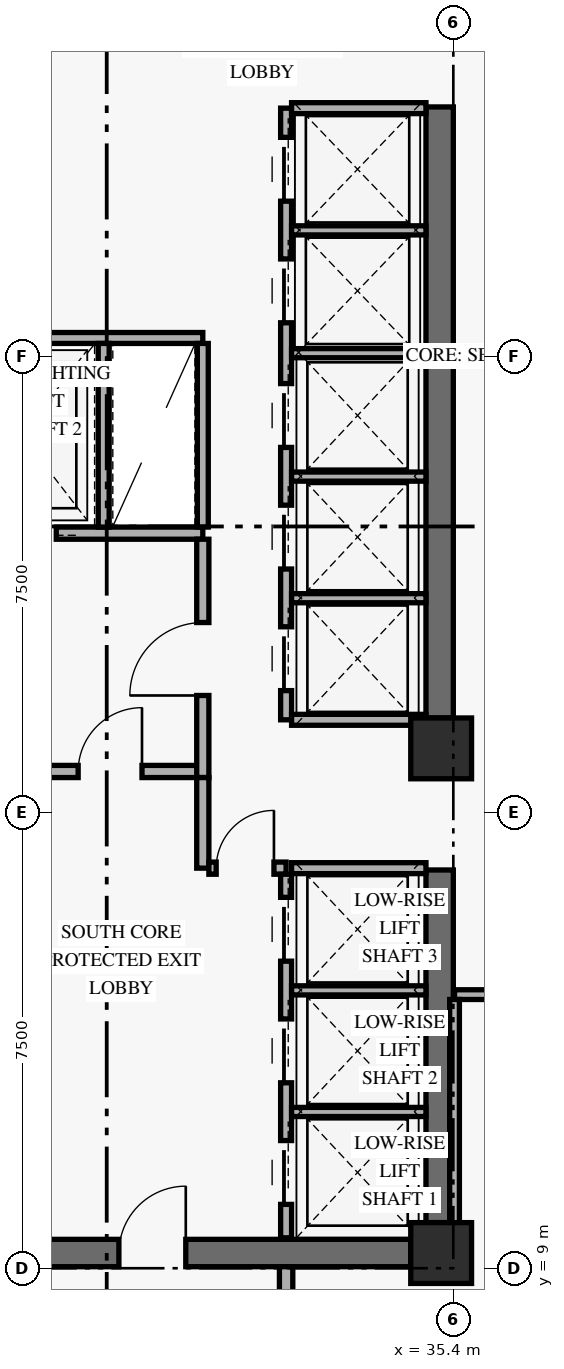
"""IFC4 building model, lengths in metres.
Left out: names, types, materials, properties, quantities, classifications, styles, units other than length and angle.
Written with IfcOpenShell. Run it as: python <this file> out.ifc"""

import sys

from ifc_helpers import new_model, si_unit, direction, frame, frame_2d, origin, origin_2d, place, context, subcontext, project, spatial, rectangle, extrude, element, fill, save


model = new_model("IFC4")
c1 = context("Model", 3, precision=1e-05, world=origin(), true_north=direction((0.0, 1.0)))
c2 = subcontext(c1, "Body", "Model", "MODEL_VIEW")
j1 = project(units=[si_unit("LENGTHUNIT", "METRE"), si_unit("PLANEANGLEUNIT", "RADIAN")], contexts=[c1])
p1 = place(None, origin())
s1 = spatial("IfcSite", under=j1, at=p1, CompositionType="ELEMENT")
p2 = place(p1, origin())
s2 = spatial("IfcBuilding", under=s1, at=p2, CompositionType="ELEMENT")
p3 = place(p2, origin())
s3 = spatial("IfcBuildingStorey", under=s2, at=p3, CompositionType="ELEMENT", Elevation=0.0)
p4 = place(p3, frame((35.175, 9.75, 0.0), z_axis=(0.0, 0.0, 1.0), x_axis=(0.0, 1.0, 0.0)))
e1 = element("IfcWall", 1, at=p4, inside=s3, PredefinedType="SHEAR", context=c2, shape_type="SweptSolid", body=[
    extrude(rectangle(XDim=5.8, YDim=0.45, at=frame_2d((2.9, 0.0))), origin(), (0.0, 0.0, 1.0), 3.539),
])
p5 = place(p3, frame((35.175, 18.05, 0.0), z_axis=(0.0, 0.0, 1.0), x_axis=(0.0, 1.0, 0.0)))
e2 = element("IfcWall", 2, at=p5, inside=s3, PredefinedType="SHEAR", context=c2, shape_type="SweptSolid", body=[
    extrude(rectangle(XDim=10.05, YDim=0.45, at=frame_2d((5.025, 0.0))), origin(), (0.0, 0.0, 1.0), 3.539),
])
p6 = place(p3, frame((24.7, 9.25, 0.0), z_axis=(0.0, 0.0, 1.0), x_axis=(1.0, 0.0, 0.0)))
e3 = element("IfcWall", 3, at=p6, inside=s3, PredefinedType="SHEAR", context=c2, shape_type="SweptSolid", body=[
    extrude(rectangle(XDim=10.0, YDim=0.45, at=frame_2d((5.0, 0.0))), origin(), (0.0, 0.0, 1.0), 4.39),
])
p7 = place(p6, frame((5.2, 0.0, 0.0)))
e4 = element("IfcOpeningElement", 4, at=p7, cuts=e3, PredefinedType="OPENING", context=c2, shape_type="SweptSolid", body=[
    extrude(rectangle(XDim=1.1, YDim=2.15, at=frame_2d((0.55, 1.075))), frame((0.0, 0.235, 0.0), z_axis=(0.0, -1.0, 0.0), x_axis=(1.0, 0.0, 0.0)), (0.0, 0.0, 1.0), 0.47),
])
for number, where, z_axis, x_axis in (
    (5, (35.2, 9.25, 0.0), (0.0, 0.0, 1.0), (1.0, 0.0, 0.0)),
    (6, (35.2, 17.55, 0.0), (0.0, 0.0, 1.0), (1.0, 0.0, 0.0)),
):
    element("IfcColumn", number, at=place(p3, frame(where, z_axis=z_axis, x_axis=x_axis)), inside=s3, PredefinedType="COLUMN", context=c2, shape_type="SweptSolid", body=[
        extrude(rectangle(XDim=1.0, YDim=1.0, at=origin_2d()), origin(), (0.0, 0.0, 1.0), 4.8),
    ])
p8 = place(p3, frame((24.45, 21.09, 0.0), z_axis=(0.0, 0.0, 1.0), x_axis=(1.0, 0.0, 0.0)))
e7 = element("IfcWall", 7, at=p8, inside=s3, PredefinedType="STANDARD", context=c2, shape_type="SweptSolid", body=[
    extrude(rectangle(XDim=6.83, YDim=0.2, at=frame_2d((3.415, 0.0))), origin(), (0.0, 0.0, 1.0), 4.39),
])
p9 = place(p8, frame((0.72, 0.0, 0.0)))
e8 = element("IfcOpeningElement", 8, at=p9, cuts=e7, PredefinedType="OPENING", context=c2, shape_type="SweptSolid", body=[
    extrude(rectangle(XDim=1.1, YDim=2.2, at=frame_2d((0.55, 1.1))), frame((0.0, 0.11, 0.0), z_axis=(0.0, -1.0, 0.0), x_axis=(1.0, 0.0, 0.0)), (0.0, 0.0, 1.0), 0.22),
])
p10 = place(p8, frame((3.32, 0.0, 0.0)))
e9 = element("IfcOpeningElement", 9, at=p10, cuts=e7, PredefinedType="OPENING", context=c2, shape_type="SweptSolid", body=[
    extrude(rectangle(XDim=1.1, YDim=2.2, at=frame_2d((0.55, 1.1))), frame((0.0, 0.11, 0.0), z_axis=(0.0, -1.0, 0.0), x_axis=(1.0, 0.0, 0.0)), (0.0, 0.0, 1.0), 0.22),
])
p11 = place(p3, frame((28.38, 17.17, 0.0), z_axis=(0.0, 0.0, 1.0), x_axis=(1.0, 0.0, 0.0)))
e10 = element("IfcWall", 10, at=p11, inside=s3, PredefinedType="STANDARD", context=c2, shape_type="SweptSolid", body=[
    extrude(rectangle(XDim=2.9, YDim=0.2, at=frame_2d((1.45, 0.0))), origin(), (0.0, 0.0, 1.0), 4.39),
])
p12 = place(p11, frame((0.85, 0.0, 0.0)))
e11 = element("IfcOpeningElement", 11, at=p12, cuts=e10, PredefinedType="OPENING", context=c2, shape_type="SweptSolid", body=[
    extrude(rectangle(XDim=1.05, YDim=2.15, at=frame_2d((0.525, 1.075))), frame((0.0, 0.11, 0.0), z_axis=(0.0, -1.0, 0.0), x_axis=(1.0, 0.0, 0.0)), (0.0, 0.0, 1.0), 0.22),
])
p13 = place(p3, frame((31.28, 17.07, 0.0), z_axis=(0.0, 0.0, 1.0), x_axis=(0.0, 1.0, 0.0)))
e12 = element("IfcWall", 12, at=p13, inside=s3, PredefinedType="STANDARD", context=c2, shape_type="SweptSolid", body=[
    extrude(rectangle(XDim=3.92, YDim=0.2, at=frame_2d((1.96, 0.0))), origin(), (0.0, 0.0, 1.0), 3.272),
])
p14 = place(p13, frame((1.35, 0.0, 0.0)))
e13 = element("IfcOpeningElement", 13, at=p14, cuts=e12, PredefinedType="OPENING", context=c2, shape_type="SweptSolid", body=[
    extrude(rectangle(XDim=1.2, YDim=2.15, at=frame_2d((0.6, 1.075))), frame((0.0, 0.11, 0.0), z_axis=(0.0, -1.0, 0.0), x_axis=(1.0, 0.0, 0.0)), (0.0, 0.0, 1.0), 0.22),
])
p15 = place(p3, frame((24.45, 24.3, 0.0), z_axis=(0.0, 0.0, 1.0), x_axis=(1.0, 0.0, 0.0)))
e14 = element("IfcWall", 14, at=p15, inside=s3, PredefinedType="STANDARD", context=c2, shape_type="SweptSolid", body=[
    extrude(rectangle(XDim=6.83, YDim=0.18, at=frame_2d((3.415, 0.0))), origin(), (0.0, 0.0, 1.0), 4.39),
])
for number, where, z_axis, x_axis in (
    (15, (29.65, 21.19, 0.0), (0.0, 0.0, 1.0), (0.0, 1.0, 0.0)),
    (16, (31.28, 21.19, 0.0), (0.0, 0.0, 1.0), (0.0, 1.0, 0.0)),
):
    element("IfcWall", number, at=place(p3, frame(where, z_axis=z_axis, x_axis=x_axis)), inside=s3, PredefinedType="STANDARD", context=c2, shape_type="SweptSolid", body=[
        extrude(rectangle(XDim=3.02, YDim=0.18, at=frame_2d((1.51, 0.0))), origin(), (0.0, 0.0, 1.0), 4.39),
    ])
p16 = place(p3, frame((31.28, 15.58, 0.0), z_axis=(0.0, 0.0, 1.0), x_axis=(0.0, 1.0, 0.0)))
e17 = element("IfcWall", 17, at=p16, inside=s3, PredefinedType="STANDARD", context=c2, shape_type="SweptSolid", body=[
    extrude(rectangle(XDim=1.49, YDim=0.2, at=frame_2d((0.745, 0.0))), origin(), (0.0, 0.0, 1.0), 4.39),
])
p17 = place(p3, frame((31.38, 15.58, 0.0), z_axis=(0.0, 0.0, 1.0), x_axis=(1.0, 0.0, 0.0)))
e18 = element("IfcWall", 18, at=p17, inside=s3, PredefinedType="STANDARD", context=c2, shape_type="SweptSolid", body=[
    extrude(rectangle(XDim=1.27, YDim=0.2, at=frame_2d((0.635, 0.0))), origin(), (0.0, 0.0, 1.0), 4.39),
])
p18 = place(p17, frame((0.12, 0.0, 0.0)))
e19 = element("IfcOpeningElement", 19, at=p18, cuts=e18, PredefinedType="OPENING", context=c2, shape_type="SweptSolid", body=[
    extrude(rectangle(XDim=0.95, YDim=2.15, at=frame_2d((0.475, 1.075))), frame((0.0, 0.11, 0.0), z_axis=(0.0, -1.0, 0.0), x_axis=(1.0, 0.0, 0.0)), (0.0, 0.0, 1.0), 0.22),
])
p19 = place(p3, frame((32.65, 9.5, 0.0), z_axis=(0.0, 0.0, 1.0), x_axis=(0.0, 1.0, 0.0)))
e20 = element("IfcWall", 20, at=p19, inside=s3, PredefinedType="STANDARD", context=c2, shape_type="SweptSolid", body=[
    extrude(rectangle(XDim=5.98, YDim=0.18, at=frame_2d((2.99, 0.0))), origin(), (0.0, 0.0, 1.0), 4.39),
])
p20 = place(p19, frame((0.55, 0.0, 0.0)))
e21 = element("IfcOpeningElement", 21, at=p20, cuts=e20, PredefinedType="OPENING", context=c2, shape_type="SweptSolid", body=[
    extrude(rectangle(XDim=1.05, YDim=2.2, at=frame_2d((0.525, 1.1))), frame((0.0, 0.1, 0.0), z_axis=(0.0, -1.0, 0.0), x_axis=(1.0, 0.0, 0.0)), (0.0, 0.0, 1.0), 0.2),
])
p21 = place(p19, frame((2.55, 0.0, 0.0)))
e22 = element("IfcOpeningElement", 22, at=p21, cuts=e20, PredefinedType="OPENING", context=c2, shape_type="SweptSolid", body=[
    extrude(rectangle(XDim=1.05, YDim=2.2, at=frame_2d((0.525, 1.1))), frame((0.0, 0.1, 0.0), z_axis=(0.0, -1.0, 0.0), x_axis=(1.0, 0.0, 0.0)), (0.0, 0.0, 1.0), 0.2),
])
p22 = place(p19, frame((4.55, 0.0, 0.0)))
e23 = element("IfcOpeningElement", 23, at=p22, cuts=e20, PredefinedType="OPENING", context=c2, shape_type="SweptSolid", body=[
    extrude(rectangle(XDim=1.05, YDim=2.2, at=frame_2d((0.525, 1.1))), frame((0.0, 0.1, 0.0), z_axis=(0.0, -1.0, 0.0), x_axis=(1.0, 0.0, 0.0)), (0.0, 0.0, 1.0), 0.2),
])
p23 = place(p3, frame((32.74, 15.58, 0.0), z_axis=(0.0, 0.0, 1.0), x_axis=(1.0, 0.0, 0.0)))
e24 = element("IfcWall", 24, at=p23, inside=s3, PredefinedType="STANDARD", context=c2, shape_type="SweptSolid", body=[
    extrude(rectangle(XDim=2.21, YDim=0.18, at=frame_2d((1.105, 0.0))), origin(), (0.0, 0.0, 1.0), 4.39),
])
for number, where, z_axis, x_axis in (
    (25, (32.74, 11.57, 0.0), (0.0, 0.0, 1.0), (1.0, 0.0, 0.0)),
    (26, (32.74, 13.57, 0.0), (0.0, 0.0, 1.0), (1.0, 0.0, 0.0)),
):
    element("IfcWall", number, at=place(p3, frame(where, z_axis=z_axis, x_axis=x_axis)), inside=s3, PredefinedType="STANDARD", context=c2, shape_type="SweptSolid", body=[
        extrude(rectangle(XDim=2.21, YDim=0.15, at=frame_2d((1.105, 0.0))), origin(), (0.0, 0.0, 1.0), 4.39),
    ])
p24 = place(p3, frame((32.65, 18.02, 0.0), z_axis=(0.0, 0.0, 1.0), x_axis=(0.0, 1.0, 0.0)))
e27 = element("IfcWall", 27, at=p24, inside=s3, PredefinedType="STANDARD", context=c2, shape_type="SweptSolid", body=[
    extrude(rectangle(XDim=10.06, YDim=0.18, at=frame_2d((5.03, 0.0))), origin(), (0.0, 0.0, 1.0), 4.39),
])
p25 = place(p24, frame((0.48, 0.0, 0.0)))
e28 = element("IfcOpeningElement", 28, at=p25, cuts=e27, PredefinedType="OPENING", context=c2, shape_type="SweptSolid", body=[
    extrude(rectangle(XDim=1.05, YDim=2.2, at=frame_2d((0.525, 1.1))), frame((0.0, 0.1, 0.0), z_axis=(0.0, -1.0, 0.0), x_axis=(1.0, 0.0, 0.0)), (0.0, 0.0, 1.0), 0.2),
])
p26 = place(p24, frame((2.48, 0.0, 0.0)))
e29 = element("IfcOpeningElement", 29, at=p26, cuts=e27, PredefinedType="OPENING", context=c2, shape_type="SweptSolid", body=[
    extrude(rectangle(XDim=1.05, YDim=2.2, at=frame_2d((0.525, 1.1))), frame((0.0, 0.1, 0.0), z_axis=(0.0, -1.0, 0.0), x_axis=(1.0, 0.0, 0.0)), (0.0, 0.0, 1.0), 0.2),
])
p27 = place(p24, frame((4.48, 0.0, 0.0)))
e30 = element("IfcOpeningElement", 30, at=p27, cuts=e27, PredefinedType="OPENING", context=c2, shape_type="SweptSolid", body=[
    extrude(rectangle(XDim=1.05, YDim=2.2, at=frame_2d((0.525, 1.1))), frame((0.0, 0.1, 0.0), z_axis=(0.0, -1.0, 0.0), x_axis=(1.0, 0.0, 0.0)), (0.0, 0.0, 1.0), 0.2),
])
p28 = place(p24, frame((6.53, 0.0, 0.0)))
e31 = element("IfcOpeningElement", 31, at=p28, cuts=e27, PredefinedType="OPENING", context=c2, shape_type="SweptSolid", body=[
    extrude(rectangle(XDim=1.05, YDim=2.2, at=frame_2d((0.525, 1.1))), frame((0.0, 0.1, 0.0), z_axis=(0.0, -1.0, 0.0), x_axis=(1.0, 0.0, 0.0)), (0.0, 0.0, 1.0), 0.2),
])
p29 = place(p24, frame((8.53, 0.0, 0.0)))
e32 = element("IfcOpeningElement", 32, at=p29, cuts=e27, PredefinedType="OPENING", context=c2, shape_type="SweptSolid", body=[
    extrude(rectangle(XDim=1.05, YDim=2.2, at=frame_2d((0.525, 1.1))), frame((0.0, 0.1, 0.0), z_axis=(0.0, -1.0, 0.0), x_axis=(1.0, 0.0, 0.0)), (0.0, 0.0, 1.0), 0.2),
])
for number, where, z_axis, x_axis in (
    (33, (32.74, 18.02, 0.0), (0.0, 0.0, 1.0), (1.0, 0.0, 0.0)),
    (34, (32.74, 28.08, 0.0), (0.0, 0.0, 1.0), (1.0, 0.0, 0.0)),
):
    element("IfcWall", number, at=place(p3, frame(where, z_axis=z_axis, x_axis=x_axis)), inside=s3, PredefinedType="STANDARD", context=c2, shape_type="SweptSolid", body=[
        extrude(rectangle(XDim=2.21, YDim=0.18, at=frame_2d((1.105, 0.0))), origin(), (0.0, 0.0, 1.0), 4.39),
    ])
for number, where, z_axis, x_axis in (
    (35, (32.74, 20.02, 0.0), (0.0, 0.0, 1.0), (1.0, 0.0, 0.0)),
    (36, (32.74, 22.02, 0.0), (0.0, 0.0, 1.0), (1.0, 0.0, 0.0)),
    (37, (32.74, 24.05, 0.0), (0.0, 0.0, 1.0), (1.0, 0.0, 0.0)),
    (38, (32.74, 26.07, 0.0), (0.0, 0.0, 1.0), (1.0, 0.0, 0.0)),
):
    element("IfcWall", number, at=place(p3, frame(where, z_axis=z_axis, x_axis=x_axis)), inside=s3, PredefinedType="STANDARD", context=c2, shape_type="SweptSolid", body=[
        extrude(rectangle(XDim=2.21, YDim=0.15, at=frame_2d((1.105, 0.0))), origin(), (0.0, 0.0, 1.0), 4.39),
    ])
p30 = place(p3, frame((32.65, 0.32, 0.0), z_axis=(0.0, 0.0, 1.0), x_axis=(0.0, 1.0, 0.0)))
e39 = element("IfcWall", 39, at=p30, inside=s3, PredefinedType="STANDARD", context=c2, shape_type="SweptSolid", body=[
    extrude(rectangle(XDim=8.705, YDim=0.22, at=frame_2d((4.353, 0.0))), origin(), (0.0, 0.0, 1.0), 3.761),
])
p31 = place(p30, frame((4.3, 0.0, 0.0)))
e40 = element("IfcOpeningElement", 40, at=p31, cuts=e39, PredefinedType="OPENING", context=c2, shape_type="SweptSolid", body=[
    extrude(rectangle(XDim=1.05, YDim=2.15, at=frame_2d((0.525, 1.075))), frame((0.0, 0.12, 0.0), z_axis=(0.0, -1.0, 0.0), x_axis=(1.0, 0.0, 0.0)), (0.0, 0.0, 1.0), 0.24),
])
p32 = place(p3, frame((35.42, 13.5, 0.0), z_axis=(0.0, 0.0, 1.0), x_axis=(1.0, 0.0, 0.0)))
e41 = element("IfcWall", 41, at=p32, inside=s3, PredefinedType="PARTITIONING", context=c2, shape_type="SweptSolid", body=[
    extrude(rectangle(XDim=20.26, YDim=0.16, at=frame_2d((10.13, 0.0))), origin(), (0.0, 0.0, 1.0), 3.521),
])
p33 = place(p32, frame((2.2, 0.0, 0.0)))
e42 = element("IfcOpeningElement", 42, at=p33, cuts=e41, PredefinedType="OPENING", context=c2, shape_type="SweptSolid", body=[
    extrude(rectangle(XDim=0.95, YDim=2.15, at=frame_2d((0.475, 1.075))), frame((0.0, 0.09, 0.0), z_axis=(0.0, -1.0, 0.0), x_axis=(1.0, 0.0, 0.0)), (0.0, 0.0, 1.0), 0.18),
])
p34 = place(p32, frame((12.2, 0.0, 0.0)))
e43 = element("IfcOpeningElement", 43, at=p34, cuts=e41, PredefinedType="OPENING", context=c2, shape_type="SweptSolid", body=[
    extrude(rectangle(XDim=0.95, YDim=2.15, at=frame_2d((0.475, 1.075))), frame((0.0, 0.09, 0.0), z_axis=(0.0, -1.0, 0.0), x_axis=(1.0, 0.0, 0.0)), (0.0, 0.0, 1.0), 0.18),
])
p35 = place(p3, frame((35.42, 9.25, 0.0), z_axis=(0.0, 0.0, 1.0), x_axis=(0.0, 1.0, 0.0)))
e44 = element("IfcWall", 44, at=p35, inside=s3, PredefinedType="PARTITIONING", context=c2, shape_type="SweptSolid", body=[
    extrude(rectangle(XDim=4.17, YDim=0.16, at=frame_2d((2.085, 0.0))), origin(), (0.0, 0.0, 1.0), 3.521),
])
p36 = place(p10, origin())
e45 = element("IfcDoor", 45, at=p36, inside=s3, OperationType="SLIDING_TO_LEFT", PredefinedType="DOOR", context=c2, shape_type="SweptSolid", body=[
    extrude(rectangle(XDim=1.1, YDim=2.2, at=frame_2d((0.55, 1.1))), frame((0.0, 0.025, 0.0), z_axis=(0.0, -1.0, 0.0), x_axis=(1.0, 0.0, 0.0)), (0.0, 0.0, 1.0), 0.05),
])
fill(e9, e45)
p37 = place(p12, origin())
e46 = element("IfcDoor", 46, at=p37, inside=s3, OperationType="SINGLE_SWING_RIGHT", PredefinedType="DOOR", context=c2, shape_type="SweptSolid", body=[
    extrude(rectangle(XDim=1.05, YDim=2.15, at=frame_2d((0.525, 1.075))), frame((0.0, 0.025, 0.0), z_axis=(0.0, -1.0, 0.0), x_axis=(1.0, 0.0, 0.0)), (0.0, 0.0, 1.0), 0.05),
])
fill(e11, e46)
p38 = place(p14, origin())
e47 = element("IfcDoor", 47, at=p38, inside=s3, OperationType="SINGLE_SWING_LEFT", PredefinedType="DOOR", context=c2, shape_type="SweptSolid", body=[
    extrude(rectangle(XDim=1.2, YDim=2.15, at=frame_2d((0.6, 1.075))), frame((0.0, 0.025, 0.0), z_axis=(0.0, -1.0, 0.0), x_axis=(1.0, 0.0, 0.0)), (0.0, 0.0, 1.0), 0.05),
])
fill(e13, e47)
p39 = place(p18, frame((0.95, 0.0, 0.0), z_axis=(0.0, 0.0, 1.0), x_axis=(-1.0, 0.0, 0.0)))
e48 = element("IfcDoor", 48, at=p39, inside=s3, OperationType="SINGLE_SWING_LEFT", PredefinedType="DOOR", context=c2, shape_type="SweptSolid", body=[
    extrude(rectangle(XDim=0.95, YDim=2.15, at=frame_2d((0.475, 1.075))), frame((0.0, 0.025, 0.0), z_axis=(0.0, -1.0, 0.0), x_axis=(1.0, 0.0, 0.0)), (0.0, 0.0, 1.0), 0.05),
])
fill(e19, e48)
p40 = place(p20, origin())
e49 = element("IfcDoor", 49, at=p40, inside=s3, OperationType="SLIDING_TO_LEFT", PredefinedType="DOOR", context=c2, shape_type="SweptSolid", body=[
    extrude(rectangle(XDim=1.05, YDim=2.2, at=frame_2d((0.525, 1.1))), frame((0.0, 0.025, 0.0), z_axis=(0.0, -1.0, 0.0), x_axis=(1.0, 0.0, 0.0)), (0.0, 0.0, 1.0), 0.05),
])
fill(e21, e49)
p41 = place(p21, origin())
e50 = element("IfcDoor", 50, at=p41, inside=s3, OperationType="SLIDING_TO_LEFT", PredefinedType="DOOR", context=c2, shape_type="SweptSolid", body=[
    extrude(rectangle(XDim=1.05, YDim=2.2, at=frame_2d((0.525, 1.1))), frame((0.0, 0.025, 0.0), z_axis=(0.0, -1.0, 0.0), x_axis=(1.0, 0.0, 0.0)), (0.0, 0.0, 1.0), 0.05),
])
fill(e22, e50)
p42 = place(p22, origin())
e51 = element("IfcDoor", 51, at=p42, inside=s3, OperationType="SLIDING_TO_LEFT", PredefinedType="DOOR", context=c2, shape_type="SweptSolid", body=[
    extrude(rectangle(XDim=1.05, YDim=2.2, at=frame_2d((0.525, 1.1))), frame((0.0, 0.025, 0.0), z_axis=(0.0, -1.0, 0.0), x_axis=(1.0, 0.0, 0.0)), (0.0, 0.0, 1.0), 0.05),
])
fill(e23, e51)
p43 = place(p25, origin())
e52 = element("IfcDoor", 52, at=p43, inside=s3, OperationType="SLIDING_TO_LEFT", PredefinedType="DOOR", context=c2, shape_type="SweptSolid", body=[
    extrude(rectangle(XDim=1.05, YDim=2.2, at=frame_2d((0.525, 1.1))), frame((0.0, 0.025, 0.0), z_axis=(0.0, -1.0, 0.0), x_axis=(1.0, 0.0, 0.0)), (0.0, 0.0, 1.0), 0.05),
])
fill(e28, e52)
p44 = place(p26, origin())
e53 = element("IfcDoor", 53, at=p44, inside=s3, OperationType="SLIDING_TO_LEFT", PredefinedType="DOOR", context=c2, shape_type="SweptSolid", body=[
    extrude(rectangle(XDim=1.05, YDim=2.2, at=frame_2d((0.525, 1.1))), frame((0.0, 0.025, 0.0), z_axis=(0.0, -1.0, 0.0), x_axis=(1.0, 0.0, 0.0)), (0.0, 0.0, 1.0), 0.05),
])
fill(e29, e53)
p45 = place(p27, origin())
e54 = element("IfcDoor", 54, at=p45, inside=s3, OperationType="SLIDING_TO_LEFT", PredefinedType="DOOR", context=c2, shape_type="SweptSolid", body=[
    extrude(rectangle(XDim=1.05, YDim=2.2, at=frame_2d((0.525, 1.1))), frame((0.0, 0.025, 0.0), z_axis=(0.0, -1.0, 0.0), x_axis=(1.0, 0.0, 0.0)), (0.0, 0.0, 1.0), 0.05),
])
fill(e30, e54)
p46 = place(p28, origin())
e55 = element("IfcDoor", 55, at=p46, inside=s3, OperationType="SLIDING_TO_LEFT", PredefinedType="DOOR", context=c2, shape_type="SweptSolid", body=[
    extrude(rectangle(XDim=1.05, YDim=2.2, at=frame_2d((0.525, 1.1))), frame((0.0, 0.025, 0.0), z_axis=(0.0, -1.0, 0.0), x_axis=(1.0, 0.0, 0.0)), (0.0, 0.0, 1.0), 0.05),
])
fill(e31, e55)
p47 = place(p29, origin())
e56 = element("IfcDoor", 56, at=p47, inside=s3, OperationType="SLIDING_TO_LEFT", PredefinedType="DOOR", context=c2, shape_type="SweptSolid", body=[
    extrude(rectangle(XDim=1.05, YDim=2.2, at=frame_2d((0.525, 1.1))), frame((0.0, 0.025, 0.0), z_axis=(0.0, -1.0, 0.0), x_axis=(1.0, 0.0, 0.0)), (0.0, 0.0, 1.0), 0.05),
])
fill(e32, e56)
p48 = place(p7, frame((1.1, 0.0, 0.0), z_axis=(0.0, 0.0, 1.0), x_axis=(-1.0, 0.0, 0.0)))
e57 = element("IfcDoor", 57, at=p48, inside=s3, OperationType="SINGLE_SWING_LEFT", PredefinedType="DOOR", context=c2, shape_type="SweptSolid", body=[
    extrude(rectangle(XDim=1.1, YDim=2.15, at=frame_2d((0.55, 1.075))), frame((0.0, 0.025, 0.0), z_axis=(0.0, -1.0, 0.0), x_axis=(1.0, 0.0, 0.0)), (0.0, 0.0, 1.0), 0.05),
])
fill(e4, e57)
save(model, sys.argv[1])
